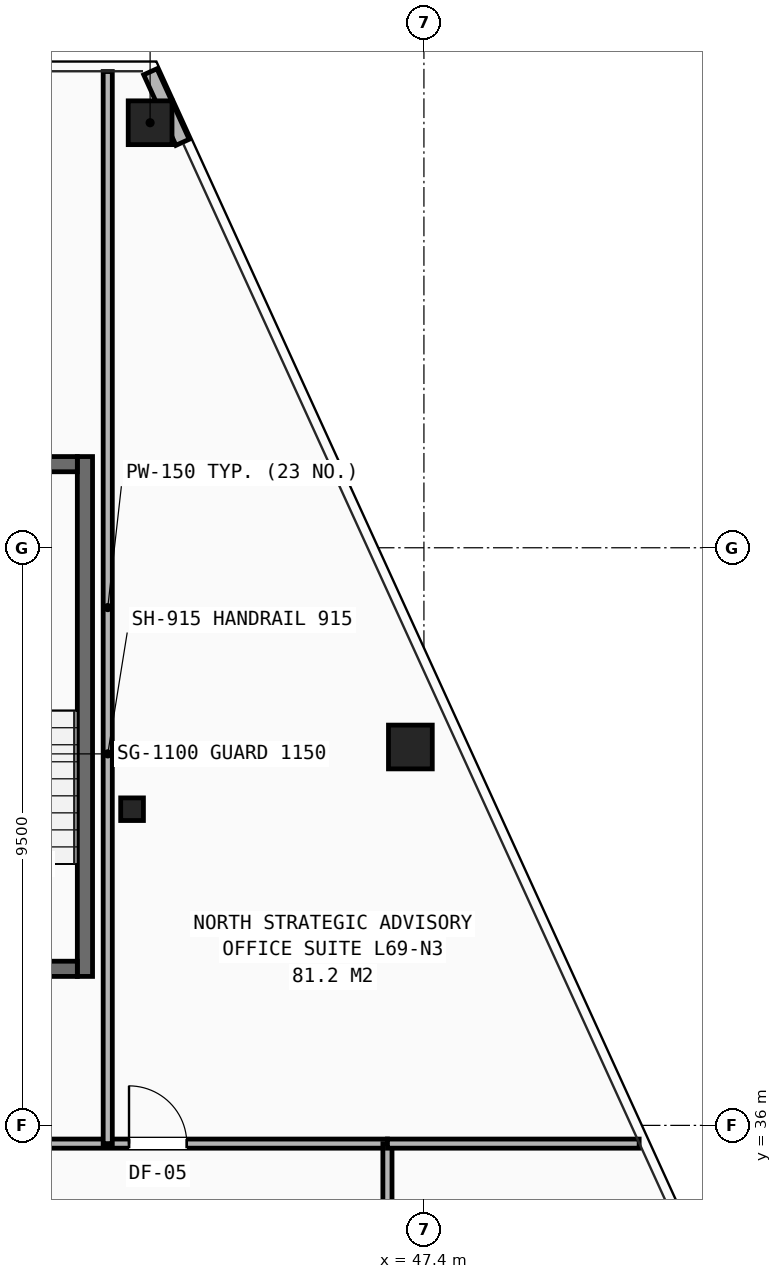
"""IFC4 building model, lengths in metres.
Left out: names, types, materials, properties, quantities, classifications, styles, units other than length and angle.
Written with IfcOpenShell. Run it as: python <this file> out.ifc"""

import sys

from ifc_helpers import new_model, si_unit, direction, frame, frame_2d, origin, origin_2d, place, context, subcontext, project, spatial, rectangle, hollow_rectangle, i_section, extrude, element, fill, save


model = new_model("IFC4")
c1 = context("Model", 3, precision=1e-05, world=origin(), true_north=direction((0.0, 1.0)))
c2 = subcontext(c1, "Body", "Model", "MODEL_VIEW")
j1 = project(units=[si_unit("LENGTHUNIT", "METRE"), si_unit("PLANEANGLEUNIT", "RADIAN")], contexts=[c1])
p1 = place(None, origin())
s1 = spatial("IfcSite", under=j1, at=p1, CompositionType="ELEMENT")
p2 = place(p1, origin())
s2 = spatial("IfcBuilding", under=s1, at=p2, CompositionType="ELEMENT")
p3 = place(p2, frame((0.0, 0.0, 243.4)))
s3 = spatial("IfcBuildingStorey", under=s2, at=p3, CompositionType="ELEMENT", Elevation=243.4)
p4 = place(p3, frame((42.6, 41.2, 0.0), z_axis=(0.0, 0.0, 1.0), x_axis=(1.0, 0.0, 0.0)))
e1 = element("IfcColumn", 1, at=p4, inside=s3, PredefinedType="COLUMN", context=c2, shape_type="SweptSolid", body=[
    extrude(i_section(OverallWidth=0.374, OverallDepth=0.372, WebThickness=0.016, FlangeThickness=0.026, at=origin_2d()), origin(), (0.0, 0.0, 1.0), 3.5),
])
for number, where, z_axis, x_axis in (
    (2, (42.897, 52.49, 0.0), (0.0, 0.0, 1.0), (1.0, 0.0, 0.0)),
    (3, (47.177, 42.223, 0.0), (0.0, 0.0, 1.0), (1.0, 0.0, 0.0)),
):
    element("IfcColumn", number, at=place(p3, frame(where, z_axis=z_axis, x_axis=x_axis)), inside=s3, PredefinedType="COLUMN", context=c2, shape_type="SweptSolid", body=[
        extrude(hollow_rectangle(XDim=0.72, YDim=0.72, WallThickness=0.05, at=origin_2d()), origin(), (0.0, 0.0, 1.0), 3.5),
    ])
p5 = place(p3, frame((43.43, 52.168, 0.0), z_axis=(0.0, 0.0, 1.0), x_axis=(-0.415158054461, 0.909749300531, 0.0)))
e4 = element("IfcWall", 4, at=p5, inside=s3, PredefinedType="SHEAR", context=c2, shape_type="SweptSolid", body=[
    extrude(rectangle(XDim=1.276, YDim=0.24, at=frame_2d((0.638, 0.0))), origin(), (0.0, 0.0, 1.0), 2.623),
])
p6 = place(p3, frame((40.75, 35.7, 0.0), z_axis=(0.0, 0.0, 1.0), x_axis=(1.0, 0.0, 0.0)))
e5 = element("IfcWall", 5, at=p6, inside=s3, PredefinedType="PARTITIONING", context=c2, shape_type="SweptSolid", body=[
    extrude(rectangle(XDim=6.05, YDim=0.15, at=frame_2d((3.025, 0.0))), origin(), (0.0, 0.0, 1.0), 3.25),
])
p7 = place(p6, frame((1.8, 0.0, 0.0)))
e6 = element("IfcOpeningElement", 6, at=p7, cuts=e5, PredefinedType="OPENING", context=c2, shape_type="SweptSolid", body=[
    extrude(rectangle(XDim=0.95, YDim=2.1, at=frame_2d((0.475, 1.05))), frame((0.0, 0.085, 0.0), z_axis=(0.0, -1.0, 0.0), x_axis=(1.0, 0.0, 0.0)), (0.0, 0.0, 1.0), 0.17),
])
p8 = place(p3, frame((46.8, 31.2, 0.0), z_axis=(0.0, 0.0, 1.0), x_axis=(0.0, 1.0, 0.0)))
e7 = element("IfcWall", 7, at=p8, inside=s3, PredefinedType="PARTITIONING", context=c2, shape_type="SweptSolid", body=[
    extrude(rectangle(XDim=4.5, YDim=0.15, at=frame_2d((2.25, 0.0))), origin(), (0.0, 0.0, 1.0), 2.705),
])
p9 = place(p3, frame((46.8, 35.7, 0.0), z_axis=(0.0, 0.0, 1.0), x_axis=(1.0, 0.0, 0.0)))
e8 = element("IfcWall", 8, at=p9, inside=s3, PredefinedType="PARTITIONING", context=c2, shape_type="SweptSolid", body=[
    extrude(rectangle(XDim=4.14, YDim=0.15, at=frame_2d((2.07, 0.0))), origin(), (0.0, 0.0, 1.0), 2.628),
])
p10 = place(p3, frame((42.2, 35.7, 0.0), z_axis=(0.0, 0.0, 1.0), x_axis=(0.0, 1.0, 0.0)))
e9 = element("IfcWall", 9, at=p10, inside=s3, PredefinedType="PARTITIONING", context=c2, shape_type="SweptSolid", body=[
    extrude(rectangle(XDim=17.632, YDim=0.15, at=frame_2d((8.816, 0.0))), origin(), (0.0, 0.0, 1.0), 2.292),
])
p11 = place(p3, frame((41.825, 38.45, 0.0), z_axis=(0.0, 0.0, 1.0), x_axis=(0.0, 1.0, 0.0)))
e10 = element("IfcWall", 10, at=p11, inside=s3, PredefinedType="SHEAR", context=c2, shape_type="SweptSolid", body=[
    extrude(rectangle(XDim=8.55, YDim=0.25, at=frame_2d((4.275, 0.0))), origin(), (0.0, 0.0, 1.0), 3.25),
])
p12 = place(p3, frame((38.3, 38.575, 0.0), z_axis=(0.0, 0.0, 1.0), x_axis=(1.0, 0.0, 0.0)))
e11 = element("IfcWall", 11, at=p12, inside=s3, PredefinedType="SHEAR", context=c2, shape_type="SweptSolid", body=[
    extrude(rectangle(XDim=3.4, YDim=0.25, at=frame_2d((1.7, 0.0))), origin(), (0.0, 0.0, 1.0), 3.25),
])
p13 = place(p12, frame((1.225, 0.0, 0.0)))
e12 = element("IfcOpeningElement", 12, at=p13, cuts=e11, PredefinedType="OPENING", context=c2, shape_type="SweptSolid", body=[
    extrude(rectangle(XDim=0.95, YDim=2.1, at=frame_2d((0.475, 1.05))), frame((0.0, 0.135, 0.0), z_axis=(0.0, -1.0, 0.0), x_axis=(1.0, 0.0, 0.0)), (0.0, 0.0, 1.0), 0.27),
])
p14 = place(p3, frame((38.3, 46.875, 0.0), z_axis=(0.0, 0.0, 1.0), x_axis=(1.0, 0.0, 0.0)))
e13 = element("IfcWall", 13, at=p14, inside=s3, PredefinedType="SHEAR", context=c2, shape_type="SweptSolid", body=[
    extrude(rectangle(XDim=3.4, YDim=0.25, at=frame_2d((1.7, 0.0))), origin(), (0.0, 0.0, 1.0), 3.25),
])
p15 = place(p7, origin())
e14 = element("IfcDoor", 14, at=p15, inside=s3, OperationType="SINGLE_SWING_LEFT", PredefinedType="DOOR", context=c2, shape_type="SweptSolid", body=[
    extrude(rectangle(XDim=0.95, YDim=2.1, at=frame_2d((0.475, 1.05))), frame((0.0, 0.025, 0.0), z_axis=(0.0, -1.0, 0.0), x_axis=(1.0, 0.0, 0.0)), (0.0, 0.0, 1.0), 0.05),
])
fill(e6, e14)
save(model, sys.argv[1])
